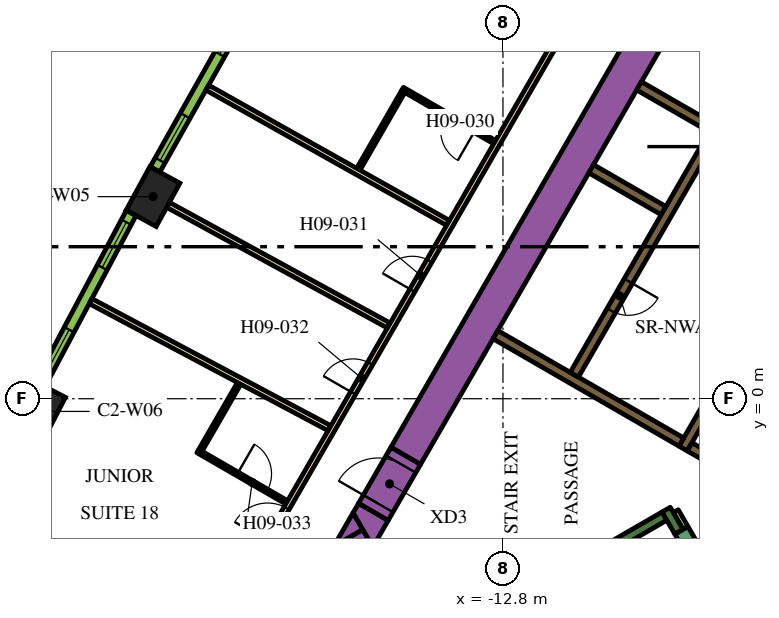
"""IFC4 building model, lengths in metres.
Left out: names, types, materials, properties, quantities, classifications, styles, units other than length and angle.
Written with IfcOpenShell. Run it as: python <this file> out.ifc"""

import sys

from ifc_helpers import new_model, si_unit, direction, frame, frame_2d, origin, origin_2d, place, context, subcontext, project, spatial, polyline, rectangle, outline, extrude, element, fill, save


model = new_model("IFC4")
c1 = context("Model", 3, precision=1e-05, world=origin(), true_north=direction((0.0, 1.0)))
c2 = subcontext(c1, "Body", "Model", "MODEL_VIEW")
j1 = project(units=[si_unit("LENGTHUNIT", "METRE"), si_unit("PLANEANGLEUNIT", "RADIAN")], contexts=[c1])
p1 = place(None, origin())
s1 = spatial("IfcSite", under=j1, at=p1, CompositionType="ELEMENT")
p2 = place(p1, origin())
s2 = spatial("IfcBuilding", under=s1, at=p2, CompositionType="ELEMENT")
p3 = place(p2, frame((0.0, 0.0, 122.7)))
s3 = spatial("IfcBuildingStorey", under=s2, at=p3, CompositionType="ELEMENT", Elevation=122.7)
for number, where, z_axis, x_axis in (
    (1, (-22.009, 5.317, 0.0), (0.0, 0.0, 1.0), (-0.48, -0.877, 0.0)),
    (2, (-25.012, -0.334, 0.0), (0.0, 0.0, 1.0), (-0.459, -0.888, 0.0)),
):
    element("IfcColumn", number, at=place(p3, frame(where, z_axis=z_axis, x_axis=x_axis)), inside=s3, PredefinedType="COLUMN", context=c2, shape_type="SweptSolid", body=[
        extrude(rectangle(XDim=1.3, YDim=0.9, at=origin_2d()), origin(), (0.0, 0.0, 1.0), 3.9),
    ])
p4 = place(p3, frame((-15.36, -1.503, 0.0), z_axis=(0.0, 0.0, 1.0), x_axis=(0.50000389221, 0.866023156604, 0.0)))
e3 = element("IfcWall", 3, at=p4, inside=s3, PredefinedType="SOLIDWALL", context=c2, shape_type="SweptSolid", body=[
    extrude(rectangle(XDim=21.0, YDim=0.9, at=frame_2d((10.5, 0.0))), origin(), (0.0, 0.0, 1.0), 3.9),
])
p5 = place(p3, frame((-12.134, -11.883, 0.0), z_axis=(0.0, 0.0, 1.0), x_axis=(-0.500005339912, 0.866022320763, 0.0)))
e4 = element("IfcWall", 4, at=p5, inside=s3, PredefinedType="SOLIDWALL", context=c2, shape_type="SweptSolid", body=[
    extrude(rectangle(XDim=9.488, YDim=0.9, at=frame_2d((4.744, 0.0))), origin(), (0.0, 0.0, 1.0), 3.9),
])
p6 = place(p3, origin())
e5 = element("IfcWall", 5, at=p6, inside=s3, PredefinedType="SOLIDWALL", context=c2, shape_type="SweptSolid", body=[
    extrude(outline(polyline([(-16.489, -3.44), (-17.251, -3.88), (-16.743, -3.0), (-16.489, -3.44)])), origin(), (0.0, 0.0, 1.0), 3.9),
])
e6 = element("IfcWall", 6, at=p6, inside=s3, PredefinedType="SOLIDWALL", context=c2, shape_type="SweptSolid", body=[
    extrude(outline(polyline([(-15.82, -3.201), (-16.223, -3.9), (-16.743, -3.0), (-16.599, -2.751), (-15.82, -3.201)])), origin(), (0.0, 0.0, 1.0), 3.9),
])
p7 = place(p3, frame((-14.44, -6.49, 0.0), z_axis=(0.0, 0.0, 1.0), x_axis=(0.866022966069, 0.500004222222, 0.0)))
e7 = element("IfcWall", 7, at=p7, inside=s3, PredefinedType="SOLIDWALL", context=c2, shape_type="SweptSolid", body=[
    extrude(rectangle(XDim=6.8, YDim=0.25, at=frame_2d((3.4, 0.0))), origin(), (0.0, 0.0, 1.0), 3.9),
])
p8 = place(p3, frame((-8.168, -3.503, 0.0), z_axis=(0.0, 0.0, 1.0), x_axis=(-0.499952099219, 0.866053057547, 0.0)))
e8 = element("IfcWall", 8, at=p8, inside=s3, PredefinedType="SOLIDWALL", context=c2, shape_type="SweptSolid", body=[
    extrude(rectangle(XDim=0.675, YDim=0.25, at=frame_2d((0.337, 0.0))), origin(), (0.0, 0.0, 1.0), 3.9),
])
p9 = place(p3, frame((-8.06, -1.311, 0.0), z_axis=(0.0, 0.0, 1.0), x_axis=(0.50000273126, 0.866023826885, 0.0)))
e9 = element("IfcWall", 9, at=p9, inside=s3, PredefinedType="SOLIDWALL", context=c2, shape_type="SweptSolid", body=[
    extrude(rectangle(XDim=10.33, YDim=0.25, at=frame_2d((5.165, 0.0))), origin(), (0.0, 0.0, 1.0), 3.9),
])
p10 = place(p3, frame((-7.889, -1.265, 0.0), z_axis=(0.0, 0.0, 1.0), x_axis=(0.865986741702, -0.500066958712, 0.0)))
e10 = element("IfcWall", 10, at=p10, inside=s3, PredefinedType="SOLIDWALL", context=c2, shape_type="SweptSolid", body=[
    extrude(rectangle(XDim=1.738, YDim=0.25, at=frame_2d((0.869, 0.0))), origin(), (0.0, 0.0, 1.0), 3.9),
])
p11 = place(p3, frame((-8.106, -1.14, 0.0), z_axis=(0.0, 0.0, 1.0), x_axis=(-0.866000643155, 0.500042884217, 0.0)))
e11 = element("IfcWall", 11, at=p11, inside=s3, PredefinedType="SOLIDWALL", context=c2, shape_type="SweptSolid", body=[
    extrude(rectangle(XDim=5.65, YDim=0.25, at=frame_2d((2.825, 0.0))), origin(), (0.0, 0.0, 1.0), 3.9),
])
for number, where, z_axis, x_axis in (
    (12, (-8.574, 4.95, 0.0), (0.0, 0.0, 1.0), (-0.866, 0.5, 0.0)),
    (13, (-7.314, 7.132, 0.0), (0.0, 0.0, 1.0), (-0.866, 0.5, 0.0)),
):
    element("IfcWall", number, at=place(p3, frame(where, z_axis=z_axis, x_axis=x_axis)), inside=s3, PredefinedType="SOLIDWALL", context=c2, shape_type="SweptSolid", body=[
        extrude(rectangle(XDim=2.2, YDim=0.25, at=frame_2d((1.1, 0.0))), origin(), (0.0, 0.0, 1.0), 3.9),
    ])
p12 = place(p3, frame((-8.252, -2.958, 0.0), z_axis=(0.0, 0.0, 1.0), x_axis=(0.500174715838, -0.865924508047, 0.0)))
e14 = element("IfcWall", 14, at=p12, inside=s3, PredefinedType="PARTITIONING", context=c2, shape_type="SweptSolid", body=[
    extrude(rectangle(XDim=0.514, YDim=0.15, at=frame_2d((0.257, 0.0))), origin(), (0.0, 0.0, 1.0), 2.75),
])
p13 = place(p3, frame((-6.008, 9.144, 0.0), z_axis=(0.0, 0.0, 1.0), x_axis=(-0.500006956611, -0.866021387346, 0.0)))
e15 = element("IfcWall", 15, at=p13, inside=s3, PredefinedType="SOLIDWALL", context=c2, shape_type="SweptSolid", body=[
    extrude(rectangle(XDim=9.83, YDim=0.25, at=frame_2d((4.915, 0.0))), origin(), (0.0, 0.0, 1.0), 3.9),
])
p14 = place(p13, frame((6.985, 0.0, 0.0)))
e16 = element("IfcOpeningElement", 16, at=p14, cuts=e15, PredefinedType="OPENING", context=c2, shape_type="SweptSolid", body=[
    extrude(rectangle(XDim=0.9, YDim=2.1, at=frame_2d((0.45, 1.05))), frame((0.0, 0.135, 0.0), z_axis=(0.0, -1.0, 0.0), x_axis=(1.0, 0.0, 0.0)), (0.0, 0.0, 1.0), 0.27),
])
p15 = place(p3, frame((-8.103, -3.466, 0.0), z_axis=(0.0, 0.0, 1.0), x_axis=(0.500078061341, -0.865980330357, 0.0)))
e17 = element("IfcWall", 17, at=p15, inside=s3, PredefinedType="SOLIDWALL", context=c2, shape_type="SweptSolid", body=[
    extrude(rectangle(XDim=2.1, YDim=0.4, at=frame_2d((1.05, 0.0))), origin(), (0.0, 0.0, 1.0), 3.9),
])
p16 = place(p15, frame((0.45, 0.0, 0.0)))
e18 = element("IfcOpeningElement", 18, at=p16, cuts=e17, PredefinedType="OPENING", context=c2, shape_type="SweptSolid", body=[
    extrude(rectangle(XDim=1.2, YDim=2.1, at=frame_2d((0.6, 1.05))), frame((0.0, 0.21, 0.0), z_axis=(0.0, -1.0, 0.0), x_axis=(1.0, 0.0, 0.0)), (0.0, 0.0, 1.0), 0.42),
])
p17 = place(p3, frame((-16.209, -2.976, 0.0), z_axis=(0.0, 0.0, 1.0), x_axis=(0.499954529098, 0.86605165483, 0.0)))
e19 = element("IfcWall", 19, at=p17, inside=s3, PredefinedType="SOLIDWALL", context=c2, shape_type="SweptSolid", body=[
    extrude(rectangle(XDim=1.7, YDim=0.9, at=frame_2d((0.85, 0.0))), origin(), (0.0, 0.0, 1.0), 3.9),
])
p18 = place(p17, frame((0.25, 0.0, 0.0)))
e20 = element("IfcOpeningElement", 20, at=p18, cuts=e19, PredefinedType="OPENING", context=c2, shape_type="SweptSolid", body=[
    extrude(rectangle(XDim=1.2, YDim=2.1, at=frame_2d((0.6, 1.05))), frame((0.0, 0.46, 0.0), z_axis=(0.0, -1.0, 0.0), x_axis=(1.0, 0.0, 0.0)), (0.0, 0.0, 1.0), 0.92),
])
p19 = place(p3, frame((-19.081, -3.9, 0.0), z_axis=(0.0, 0.0, 1.0), x_axis=(0.499998313975, 0.866026377209, 0.0)))
e21 = element("IfcWall", 21, at=p19, inside=s3, PredefinedType="PARTITIONING", context=c2, shape_type="SweptSolid", body=[
    extrude(rectangle(XDim=25.766, YDim=0.15, at=frame_2d((12.883, 0.0))), origin(), (0.0, 0.0, 1.0), 2.75),
])
p20 = place(p19, frame((19.306, 0.0, 0.0)))
e22 = element("IfcOpeningElement", 22, at=p20, cuts=e21, PredefinedType="OPENING", context=c2, shape_type="SweptSolid", body=[
    extrude(rectangle(XDim=1.0, YDim=2.1, at=frame_2d((0.5, 1.05))), frame((0.0, 0.085, 0.0), z_axis=(0.0, -1.0, 0.0), x_axis=(1.0, 0.0, 0.0)), (0.0, 0.0, 1.0), 0.17),
])
p21 = place(p19, frame((18.0, 0.0, 0.0)))
e23 = element("IfcOpeningElement", 23, at=p21, cuts=e21, PredefinedType="OPENING", context=c2, shape_type="SweptSolid", body=[
    extrude(rectangle(XDim=1.0, YDim=2.1, at=frame_2d((0.5, 1.05))), frame((0.0, 0.085, 0.0), z_axis=(0.0, -1.0, 0.0), x_axis=(1.0, 0.0, 0.0)), (0.0, 0.0, 1.0), 0.17),
])
p22 = place(p19, frame((7.793, 0.0, 0.0)))
e24 = element("IfcOpeningElement", 24, at=p22, cuts=e21, PredefinedType="OPENING", context=c2, shape_type="SweptSolid", body=[
    extrude(rectangle(XDim=0.9, YDim=2.1, at=frame_2d((0.45, 1.05))), frame((0.0, 0.085, 0.0), z_axis=(0.0, -1.0, 0.0), x_axis=(1.0, 0.0, 0.0)), (0.0, 0.0, 1.0), 0.17),
])
p23 = place(p19, frame((4.674, 0.0, 0.0)))
e25 = element("IfcOpeningElement", 25, at=p23, cuts=e21, PredefinedType="OPENING", context=c2, shape_type="SweptSolid", body=[
    extrude(rectangle(XDim=0.9, YDim=2.1, at=frame_2d((0.45, 1.05))), frame((0.0, 0.085, 0.0), z_axis=(0.0, -1.0, 0.0), x_axis=(1.0, 0.0, 0.0)), (0.0, 0.0, 1.0), 0.17),
])
p24 = place(p19, frame((0.18, 0.0, 0.0)))
e26 = element("IfcOpeningElement", 26, at=p24, cuts=e21, PredefinedType="OPENING", context=c2, shape_type="SweptSolid", body=[
    extrude(rectangle(XDim=1.0, YDim=2.1, at=frame_2d((0.5, 1.05))), frame((0.0, 0.085, 0.0), z_axis=(0.0, -1.0, 0.0), x_axis=(1.0, 0.0, 0.0)), (0.0, 0.0, 1.0), 0.17),
])
p25 = place(p3, frame((-23.652, 2.567, 0.0), z_axis=(0.0, 0.0, 1.0), x_axis=(0.883019237957, -0.469336793144, 0.0)))
e27 = element("IfcWall", 27, at=p25, inside=s3, PredefinedType="PARTITIONING", context=c2, shape_type="SweptSolid", body=[
    extrude(rectangle(XDim=7.111, YDim=0.15, at=frame_2d((3.555, 0.0))), origin(), (0.0, 0.0, 1.0), 2.75),
])
p26 = place(p3, frame((-26.591, -3.122, 0.0), z_axis=(0.0, 0.0, 1.0), x_axis=(0.893766213273, -0.448533115847, 0.0)))
e28 = element("IfcWall", 28, at=p26, inside=s3, PredefinedType="PARTITIONING", context=c2, shape_type="SweptSolid", body=[
    extrude(rectangle(XDim=10.875, YDim=0.15, at=frame_2d((5.438, 0.0))), origin(), (0.0, 0.0, 1.0), 2.75),
])
p27 = place(p3, frame((-21.614, 5.102, 0.0), z_axis=(0.0, 0.0, 1.0), x_axis=(0.877484555087, -0.479604895287, 0.0)))
e29 = element("IfcWall", 29, at=p27, inside=s3, PredefinedType="PARTITIONING", context=c2, shape_type="SweptSolid", body=[
    extrude(rectangle(XDim=6.611, YDim=0.15, at=frame_2d((3.306, 0.0))), origin(), (0.0, 0.0, 1.0), 2.75),
])
p28 = place(p3, frame((-20.581, 8.185, 0.0), z_axis=(0.0, 0.0, 1.0), x_axis=(0.871820720803, -0.489825102233, 0.0)))
e30 = element("IfcWall", 30, at=p28, inside=s3, PredefinedType="PARTITIONING", context=c2, shape_type="SweptSolid", body=[
    extrude(rectangle(XDim=7.257, YDim=0.15, at=frame_2d((3.628, 0.0))), origin(), (0.0, 0.0, 1.0), 2.75),
])
p29 = place(p3, frame((-13.019, 6.751, 0.0), z_axis=(0.0, 0.0, 1.0), x_axis=(-0.866034573852, 0.49998411664, 0.0)))
e31 = element("IfcWall", 31, at=p29, inside=s3, PredefinedType="PARTITIONING", context=c2, shape_type="SweptSolid", body=[
    extrude(rectangle(XDim=2.8, YDim=0.1, at=frame_2d((1.4, 0.0))), origin(), (0.0, 0.0, 1.0), 2.75),
])
p30 = place(p29, frame((0.6, 0.0, 0.0)))
e32 = element("IfcOpeningElement", 32, at=p30, cuts=e31, PredefinedType="OPENING", context=c2, shape_type="SweptSolid", body=[
    extrude(rectangle(XDim=0.9, YDim=2.1, at=frame_2d((0.45, 1.05))), frame((0.0, 0.06, 0.0), z_axis=(0.0, -1.0, 0.0), x_axis=(1.0, 0.0, 0.0)), (0.0, 0.0, 1.0), 0.12),
])
p31 = place(p3, frame((-15.425, 8.083, 0.0), z_axis=(0.0, 0.0, 1.0), x_axis=(-0.500032858622, -0.866006432019, 0.0)))
e33 = element("IfcWall", 33, at=p31, inside=s3, PredefinedType="PARTITIONING", context=c2, shape_type="SweptSolid", body=[
    extrude(rectangle(XDim=2.36, YDim=0.1, at=frame_2d((1.18, 0.0))), origin(), (0.0, 0.0, 1.0), 2.75),
])
p32 = place(p3, frame((-20.829, -1.377, 0.0), z_axis=(0.0, 0.0, 1.0), x_axis=(0.866036505625, -0.499980770555, 0.0)))
e34 = element("IfcWall", 34, at=p32, inside=s3, PredefinedType="PARTITIONING", context=c2, shape_type="SweptSolid", body=[
    extrude(rectangle(XDim=2.7, YDim=0.1, at=frame_2d((1.35, 0.0))), origin(), (0.0, 0.0, 1.0), 2.75),
])
p33 = place(p32, frame((1.2, 0.0, 0.0)))
e35 = element("IfcOpeningElement", 35, at=p33, cuts=e34, PredefinedType="OPENING", context=c2, shape_type="SweptSolid", body=[
    extrude(rectangle(XDim=0.9, YDim=2.1, at=frame_2d((0.45, 1.05))), frame((0.0, 0.06, 0.0), z_axis=(0.0, -1.0, 0.0), x_axis=(1.0, 0.0, 0.0)), (0.0, 0.0, 1.0), 0.12),
])
p34 = place(p3, frame((-20.761, -1.359, 0.0), z_axis=(0.0, 0.0, 1.0), x_axis=(0.499954962928, 0.866051404389, 0.0)))
e36 = element("IfcWall", 36, at=p34, inside=s3, PredefinedType="PARTITIONING", context=c2, shape_type="SweptSolid", body=[
    extrude(rectangle(XDim=2.03, YDim=0.1, at=frame_2d((1.015, 0.0))), origin(), (0.0, 0.0, 1.0), 2.75),
])
p35 = place(p3, frame((-19.458, 10.48, 0.0), z_axis=(0.0, 0.0, 1.0), x_axis=(-0.48983164787, -0.87181704316, 0.0)))
e37 = element("IfcWall", 37, at=p35, inside=s3, PredefinedType="SOLIDWALL", context=c2, shape_type="SweptSolid", body=[
    extrude(rectangle(XDim=5.1, YDim=0.29, at=frame_2d((2.55, 0.0))), origin(), (0.0, 0.0, 1.0), 3.65),
])
p36 = place(p35, frame((0.272, 0.0, 0.9)))
e38 = element("IfcOpeningElement", 38, at=p36, cuts=e37, PredefinedType="OPENING", context=c2, shape_type="SweptSolid", body=[
    extrude(rectangle(XDim=1.35, YDim=2.15, at=frame_2d((0.675, 1.075))), frame((0.0, 0.155, 0.0), z_axis=(0.0, -1.0, 0.0), x_axis=(1.0, 0.0, 0.0)), (0.0, 0.0, 1.0), 0.31),
])
p37 = place(p35, frame((3.478, 0.0, 0.9)))
e39 = element("IfcOpeningElement", 39, at=p37, cuts=e37, PredefinedType="OPENING", context=c2, shape_type="SweptSolid", body=[
    extrude(rectangle(XDim=1.35, YDim=2.15, at=frame_2d((0.675, 1.075))), frame((0.0, 0.155, 0.0), z_axis=(0.0, -1.0, 0.0), x_axis=(1.0, 0.0, 0.0)), (0.0, 0.0, 1.0), 0.31),
])
p38 = place(p3, frame((-22.583, 4.887, 0.0), z_axis=(0.0, 0.0, 1.0), x_axis=(-0.469323203119, -0.883026461106, 0.0)))
e40 = element("IfcWall", 40, at=p38, inside=s3, PredefinedType="SOLIDWALL", context=c2, shape_type="SweptSolid", body=[
    extrude(rectangle(XDim=5.101, YDim=0.29, at=frame_2d((2.55, 0.0))), origin(), (0.0, 0.0, 1.0), 3.65),
])
p39 = place(p38, frame((0.273, 0.0, 0.9)))
e41 = element("IfcOpeningElement", 41, at=p39, cuts=e40, PredefinedType="OPENING", context=c2, shape_type="SweptSolid", body=[
    extrude(rectangle(XDim=1.35, YDim=2.15, at=frame_2d((0.675, 1.075))), frame((0.0, 0.155, 0.0), z_axis=(0.0, -1.0, 0.0), x_axis=(1.0, 0.0, 0.0)), (0.0, 0.0, 1.0), 0.31),
])
p40 = place(p38, frame((3.478, 0.0, 0.9)))
e42 = element("IfcOpeningElement", 42, at=p40, cuts=e40, PredefinedType="OPENING", context=c2, shape_type="SweptSolid", body=[
    extrude(rectangle(XDim=1.35, YDim=2.15, at=frame_2d((0.675, 1.075))), frame((0.0, 0.155, 0.0), z_axis=(0.0, -1.0, 0.0), x_axis=(1.0, 0.0, 0.0)), (0.0, 0.0, 1.0), 0.31),
])
p41 = place(p14, origin())
e43 = element("IfcDoor", 43, at=p41, inside=s3, OperationType="SINGLE_SWING_LEFT", PredefinedType="DOOR", context=c2, shape_type="SweptSolid", body=[
    extrude(rectangle(XDim=0.9, YDim=2.1, at=frame_2d((0.45, 1.05))), frame((0.0, 0.025, 0.0), z_axis=(0.0, -1.0, 0.0), x_axis=(1.0, 0.0, 0.0)), (0.0, 0.0, 1.0), 0.05),
])
fill(e16, e43)
p42 = place(p18, origin())
e44 = element("IfcDoor", 44, at=p42, inside=s3, OperationType="SINGLE_SWING_LEFT", PredefinedType="DOOR", context=c2, shape_type="SweptSolid", body=[
    extrude(rectangle(XDim=1.2, YDim=2.1, at=frame_2d((0.6, 1.05))), frame((0.0, 0.025, 0.0), z_axis=(0.0, -1.0, 0.0), x_axis=(1.0, 0.0, 0.0)), (0.0, 0.0, 1.0), 0.05),
])
fill(e20, e44)
p43 = place(p30, origin())
e45 = element("IfcDoor", 45, at=p43, inside=s3, OperationType="SINGLE_SWING_RIGHT", PredefinedType="DOOR", context=c2, shape_type="SweptSolid", body=[
    extrude(rectangle(XDim=0.9, YDim=2.1, at=frame_2d((0.45, 1.05))), frame((0.0, 0.025, 0.0), z_axis=(0.0, -1.0, 0.0), x_axis=(1.0, 0.0, 0.0)), (0.0, 0.0, 1.0), 0.05),
])
fill(e32, e45)
p44 = place(p22, origin())
e46 = element("IfcDoor", 46, at=p44, inside=s3, OperationType="SINGLE_SWING_RIGHT", PredefinedType="DOOR", context=c2, shape_type="SweptSolid", body=[
    extrude(rectangle(XDim=0.9, YDim=2.1, at=frame_2d((0.45, 1.05))), frame((0.0, 0.025, 0.0), z_axis=(0.0, -1.0, 0.0), x_axis=(1.0, 0.0, 0.0)), (0.0, 0.0, 1.0), 0.05),
])
fill(e24, e46)
p45 = place(p23, origin())
e47 = element("IfcDoor", 47, at=p45, inside=s3, OperationType="SINGLE_SWING_LEFT", PredefinedType="DOOR", context=c2, shape_type="SweptSolid", body=[
    extrude(rectangle(XDim=0.9, YDim=2.1, at=frame_2d((0.45, 1.05))), frame((0.0, 0.025, 0.0), z_axis=(0.0, -1.0, 0.0), x_axis=(1.0, 0.0, 0.0)), (0.0, 0.0, 1.0), 0.05),
])
fill(e25, e47)
p46 = place(p24, origin())
e48 = element("IfcDoor", 48, at=p46, inside=s3, OperationType="SINGLE_SWING_LEFT", PredefinedType="DOOR", context=c2, shape_type="SweptSolid", body=[
    extrude(rectangle(XDim=1.0, YDim=2.1, at=frame_2d((0.5, 1.05))), frame((0.0, 0.025, 0.0), z_axis=(0.0, -1.0, 0.0), x_axis=(1.0, 0.0, 0.0)), (0.0, 0.0, 1.0), 0.05),
])
fill(e26, e48)
p47 = place(p33, origin())
e49 = element("IfcDoor", 49, at=p47, inside=s3, OperationType="SINGLE_SWING_RIGHT", PredefinedType="DOOR", context=c2, shape_type="SweptSolid", body=[
    extrude(rectangle(XDim=0.9, YDim=2.1, at=frame_2d((0.45, 1.05))), frame((0.0, 0.025, 0.0), z_axis=(0.0, -1.0, 0.0), x_axis=(1.0, 0.0, 0.0)), (0.0, 0.0, 1.0), 0.05),
])
fill(e35, e49)
p48 = place(p36, origin())
e50 = element("IfcWindow", 50, at=p48, inside=s3, PartitioningType="DOUBLE_PANEL_VERTICAL", PredefinedType="WINDOW", context=c2, shape_type="SweptSolid", body=[
    extrude(rectangle(XDim=1.35, YDim=2.15, at=frame_2d((0.675, 1.075))), frame((0.0, 0.015, 0.0), z_axis=(0.0, -1.0, 0.0), x_axis=(1.0, 0.0, 0.0)), (0.0, 0.0, 1.0), 0.06),
])
fill(e38, e50)
p49 = place(p37, origin())
e51 = element("IfcWindow", 51, at=p49, inside=s3, PartitioningType="DOUBLE_PANEL_VERTICAL", PredefinedType="WINDOW", context=c2, shape_type="SweptSolid", body=[
    extrude(rectangle(XDim=1.35, YDim=2.15, at=frame_2d((0.675, 1.075))), frame((0.0, 0.015, 0.0), z_axis=(0.0, -1.0, 0.0), x_axis=(1.0, 0.0, 0.0)), (0.0, 0.0, 1.0), 0.06),
])
fill(e39, e51)
p50 = place(p39, origin())
e52 = element("IfcWindow", 52, at=p50, inside=s3, PartitioningType="DOUBLE_PANEL_VERTICAL", PredefinedType="WINDOW", context=c2, shape_type="SweptSolid", body=[
    extrude(rectangle(XDim=1.35, YDim=2.15, at=frame_2d((0.675, 1.075))), frame((0.0, 0.015, 0.0), z_axis=(0.0, -1.0, 0.0), x_axis=(1.0, 0.0, 0.0)), (0.0, 0.0, 1.0), 0.06),
])
fill(e41, e52)
p51 = place(p40, origin())
e53 = element("IfcWindow", 53, at=p51, inside=s3, PartitioningType="DOUBLE_PANEL_VERTICAL", PredefinedType="WINDOW", context=c2, shape_type="SweptSolid", body=[
    extrude(rectangle(XDim=1.35, YDim=2.15, at=frame_2d((0.675, 1.075))), frame((0.0, 0.015, 0.0), z_axis=(0.0, -1.0, 0.0), x_axis=(1.0, 0.0, 0.0)), (0.0, 0.0, 1.0), 0.06),
])
fill(e42, e53)
save(model, sys.argv[1])
